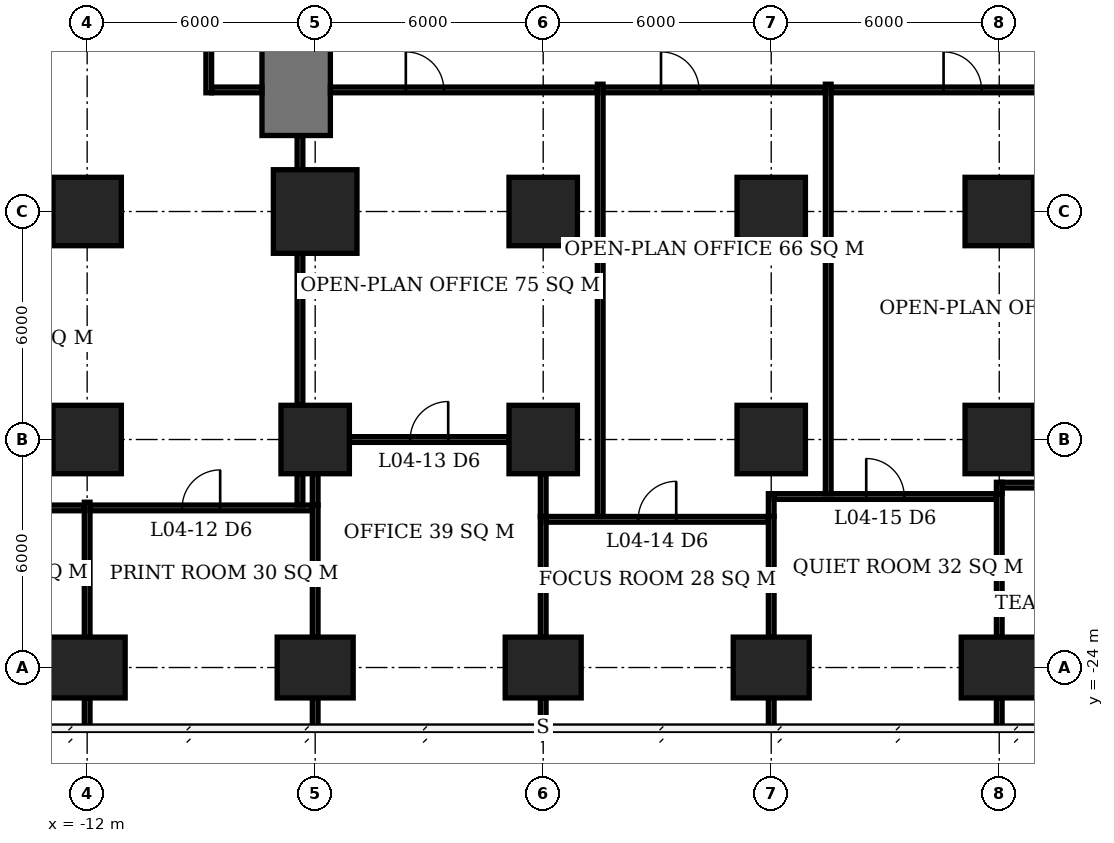
"""IFC4 building model, lengths in metres.
Left out: names, types, materials, properties, quantities, classifications, styles, units other than length and angle.
Written with IfcOpenShell. Run it as: python <this file> out.ifc"""

import sys

from ifc_helpers import new_model, si_unit, direction, frame, frame_2d, origin, origin_2d, place, context, subcontext, project, spatial, rectangle, extrude, element, fill, save


model = new_model("IFC4")
c1 = context("Model", 3, precision=1e-05, world=origin(), true_north=direction((0.0, 1.0)))
c2 = subcontext(c1, "Body", "Model", "MODEL_VIEW")
j1 = project(units=[si_unit("LENGTHUNIT", "METRE"), si_unit("PLANEANGLEUNIT", "RADIAN")], contexts=[c1])
p1 = place(None, origin())
s1 = spatial("IfcSite", under=j1, at=p1, CompositionType="ELEMENT")
p2 = place(p1, origin())
s2 = spatial("IfcBuilding", under=s1, at=p2, CompositionType="ELEMENT")
p3 = place(p2, frame((0.0, 0.0, 22.1)))
s3 = spatial("IfcBuildingStorey", under=s2, at=p3, CompositionType="ELEMENT", Elevation=22.1)
p4 = place(p3, frame((-12.0, -24.0, 0.0), z_axis=(0.0, 0.0, 1.0), x_axis=(1.0, 0.0, 0.0)))
e1 = element("IfcColumn", 1, at=p4, inside=s3, PredefinedType="COLUMN", context=c2, shape_type="SweptSolid", body=[
    extrude(rectangle(XDim=2.0, YDim=1.6, at=origin_2d()), origin(), (0.0, 0.0, 1.0), 3.9),
])
p5 = place(p3, frame((-12.0, -18.0, -0.55), z_axis=(0.0, 0.0, 1.0), x_axis=(1.0, 0.0, 0.0)))
e2 = element("IfcColumn", 2, at=p5, inside=s3, PredefinedType="COLUMN", context=c2, shape_type="SweptSolid", body=[
    extrude(rectangle(XDim=1.8, YDim=1.8, at=origin_2d()), origin(), (0.0, 0.0, 1.0), 4.45),
])
p6 = place(p3, frame((-12.0, -12.0, 0.0), z_axis=(0.0, 0.0, 1.0), x_axis=(1.0, 0.0, 0.0)))
e3 = element("IfcColumn", 3, at=p6, inside=s3, PredefinedType="COLUMN", context=c2, shape_type="SweptSolid", body=[
    extrude(rectangle(XDim=1.8, YDim=1.8, at=origin_2d()), origin(), (0.0, 0.0, 1.0), 3.9),
])
p7 = place(p3, frame((-6.0, -24.0, 0.0), z_axis=(0.0, 0.0, 1.0), x_axis=(1.0, 0.0, 0.0)))
e4 = element("IfcColumn", 4, at=p7, inside=s3, PredefinedType="COLUMN", context=c2, shape_type="SweptSolid", body=[
    extrude(rectangle(XDim=2.0, YDim=1.6, at=origin_2d()), origin(), (0.0, 0.0, 1.0), 3.9),
])
p8 = place(p3, frame((-6.0, -18.0, -0.55), z_axis=(0.0, 0.0, 1.0), x_axis=(1.0, 0.0, 0.0)))
e5 = element("IfcColumn", 5, at=p8, inside=s3, PredefinedType="COLUMN", context=c2, shape_type="SweptSolid", body=[
    extrude(rectangle(XDim=1.8, YDim=1.8, at=origin_2d()), origin(), (0.0, 0.0, 1.0), 4.45),
])
p9 = place(p3, frame((-6.0, -12.0, 0.0), z_axis=(0.0, 0.0, 1.0), x_axis=(1.0, 0.0, 0.0)))
e6 = element("IfcColumn", 6, at=p9, inside=s3, PredefinedType="COLUMN", context=c2, shape_type="SweptSolid", body=[
    extrude(rectangle(XDim=2.2, YDim=2.2, at=origin_2d()), origin(), (0.0, 0.0, 1.0), 3.9),
])
p10 = place(p3, frame((0.0, -24.0, 0.0), z_axis=(0.0, 0.0, 1.0), x_axis=(1.0, 0.0, 0.0)))
e7 = element("IfcColumn", 7, at=p10, inside=s3, PredefinedType="COLUMN", context=c2, shape_type="SweptSolid", body=[
    extrude(rectangle(XDim=2.0, YDim=1.6, at=origin_2d()), origin(), (0.0, 0.0, 1.0), 3.9),
])
p11 = place(p3, frame((0.0, -18.0, -0.55), z_axis=(0.0, 0.0, 1.0), x_axis=(1.0, 0.0, 0.0)))
e8 = element("IfcColumn", 8, at=p11, inside=s3, PredefinedType="COLUMN", context=c2, shape_type="SweptSolid", body=[
    extrude(rectangle(XDim=1.8, YDim=1.8, at=origin_2d()), origin(), (0.0, 0.0, 1.0), 4.45),
])
p12 = place(p3, frame((0.0, -12.0, 0.0), z_axis=(0.0, 0.0, 1.0), x_axis=(1.0, 0.0, 0.0)))
e9 = element("IfcColumn", 9, at=p12, inside=s3, PredefinedType="COLUMN", context=c2, shape_type="SweptSolid", body=[
    extrude(rectangle(XDim=1.8, YDim=1.8, at=origin_2d()), origin(), (0.0, 0.0, 1.0), 3.9),
])
p13 = place(p3, frame((6.0, -24.0, 0.0), z_axis=(0.0, 0.0, 1.0), x_axis=(1.0, 0.0, 0.0)))
e10 = element("IfcColumn", 10, at=p13, inside=s3, PredefinedType="COLUMN", context=c2, shape_type="SweptSolid", body=[
    extrude(rectangle(XDim=2.0, YDim=1.6, at=origin_2d()), origin(), (0.0, 0.0, 1.0), 3.9),
])
p14 = place(p3, frame((6.0, -18.0, -0.55), z_axis=(0.0, 0.0, 1.0), x_axis=(1.0, 0.0, 0.0)))
e11 = element("IfcColumn", 11, at=p14, inside=s3, PredefinedType="COLUMN", context=c2, shape_type="SweptSolid", body=[
    extrude(rectangle(XDim=1.8, YDim=1.8, at=origin_2d()), origin(), (0.0, 0.0, 1.0), 4.45),
])
p15 = place(p3, frame((6.0, -12.0, 0.0), z_axis=(0.0, 0.0, 1.0), x_axis=(1.0, 0.0, 0.0)))
e12 = element("IfcColumn", 12, at=p15, inside=s3, PredefinedType="COLUMN", context=c2, shape_type="SweptSolid", body=[
    extrude(rectangle(XDim=1.8, YDim=1.8, at=origin_2d()), origin(), (0.0, 0.0, 1.0), 3.9),
])
p16 = place(p3, frame((12.0, -24.0, 0.0), z_axis=(0.0, 0.0, 1.0), x_axis=(1.0, 0.0, 0.0)))
e13 = element("IfcColumn", 13, at=p16, inside=s3, PredefinedType="COLUMN", context=c2, shape_type="SweptSolid", body=[
    extrude(rectangle(XDim=2.0, YDim=1.6, at=origin_2d()), origin(), (0.0, 0.0, 1.0), 3.9),
])
p17 = place(p3, frame((12.0, -18.0, -0.55), z_axis=(0.0, 0.0, 1.0), x_axis=(1.0, 0.0, 0.0)))
e14 = element("IfcColumn", 14, at=p17, inside=s3, PredefinedType="COLUMN", context=c2, shape_type="SweptSolid", body=[
    extrude(rectangle(XDim=1.8, YDim=1.8, at=origin_2d()), origin(), (0.0, 0.0, 1.0), 4.45),
])
p18 = place(p3, frame((12.0, -12.0, 0.0), z_axis=(0.0, 0.0, 1.0), x_axis=(1.0, 0.0, 0.0)))
e15 = element("IfcColumn", 15, at=p18, inside=s3, PredefinedType="COLUMN", context=c2, shape_type="SweptSolid", body=[
    extrude(rectangle(XDim=1.8, YDim=1.8, at=origin_2d()), origin(), (0.0, 0.0, 1.0), 3.9),
])
p19 = place(p3, frame((-6.5, -10.0, 0.0), z_axis=(0.0, 0.0, 1.0), x_axis=(0.0, 1.0, 0.0)))
e16 = element("IfcWall", 16, at=p19, inside=s3, PredefinedType="SHEAR", context=c2, shape_type="SweptSolid", body=[
    extrude(rectangle(XDim=2.4, YDim=1.8, at=frame_2d((1.2, 0.0))), origin(), (0.0, 0.0, 1.0), 3.9),
])
p20 = place(p3, frame((0.075, -20.1, 0.0), z_axis=(0.0, 0.0, 1.0), x_axis=(1.0, 0.0, 0.0)))
e17 = element("IfcWall", 17, at=p20, inside=s3, PredefinedType="PARTITIONING", context=c2, shape_type="SweptSolid", body=[
    extrude(rectangle(XDim=5.85, YDim=0.15, at=frame_2d((2.925, 0.0))), origin(), (0.0, 0.0, 1.0), 3.65),
])
p21 = place(p20, frame((2.425, 0.0, 0.0)))
e18 = element("IfcOpeningElement", 18, at=p21, cuts=e17, PredefinedType="OPENING", context=c2, shape_type="SweptSolid", body=[
    extrude(rectangle(XDim=1.0, YDim=2.1, at=frame_2d((0.5, 1.05))), frame((0.0, 0.085, 0.0), z_axis=(0.0, -1.0, 0.0), x_axis=(1.0, 0.0, 0.0)), (0.0, 0.0, 1.0), 0.17),
])
p22 = place(p3, frame((-17.925, -19.8, 0.0), z_axis=(0.0, 0.0, 1.0), x_axis=(1.0, 0.0, 0.0)))
e19 = element("IfcWall", 19, at=p22, inside=s3, PredefinedType="PARTITIONING", context=c2, shape_type="SweptSolid", body=[
    extrude(rectangle(XDim=5.85, YDim=0.15, at=frame_2d((2.925, 0.0))), origin(), (0.0, 0.0, 1.0), 3.65),
])
p23 = place(p22, frame((2.425, 0.0, 0.0)))
e20 = element("IfcOpeningElement", 20, at=p23, cuts=e19, PredefinedType="OPENING", context=c2, shape_type="SweptSolid", body=[
    extrude(rectangle(XDim=1.0, YDim=2.1, at=frame_2d((0.5, 1.05))), frame((0.0, 0.085, 0.0), z_axis=(0.0, -1.0, 0.0), x_axis=(1.0, 0.0, 0.0)), (0.0, 0.0, 1.0), 0.17),
])
p24 = place(p3, frame((-11.925, -19.8, 0.0), z_axis=(0.0, 0.0, 1.0), x_axis=(1.0, 0.0, 0.0)))
e21 = element("IfcWall", 21, at=p24, inside=s3, PredefinedType="PARTITIONING", context=c2, shape_type="SweptSolid", body=[
    extrude(rectangle(XDim=5.85, YDim=0.15, at=frame_2d((2.925, 0.0))), origin(), (0.0, 0.0, 1.0), 3.65),
])
p25 = place(p24, frame((2.425, 0.0, 0.0)))
e22 = element("IfcOpeningElement", 22, at=p25, cuts=e21, PredefinedType="OPENING", context=c2, shape_type="SweptSolid", body=[
    extrude(rectangle(XDim=1.0, YDim=2.1, at=frame_2d((0.5, 1.05))), frame((0.0, 0.085, 0.0), z_axis=(0.0, -1.0, 0.0), x_axis=(1.0, 0.0, 0.0)), (0.0, 0.0, 1.0), 0.17),
])
p26 = place(p3, frame((6.075, -19.5, 0.0), z_axis=(0.0, 0.0, 1.0), x_axis=(1.0, 0.0, 0.0)))
e23 = element("IfcWall", 23, at=p26, inside=s3, PredefinedType="PARTITIONING", context=c2, shape_type="SweptSolid", body=[
    extrude(rectangle(XDim=5.85, YDim=0.15, at=frame_2d((2.925, 0.0))), origin(), (0.0, 0.0, 1.0), 3.65),
])
p27 = place(p26, frame((2.425, 0.0, 0.0)))
e24 = element("IfcOpeningElement", 24, at=p27, cuts=e23, PredefinedType="OPENING", context=c2, shape_type="SweptSolid", body=[
    extrude(rectangle(XDim=1.0, YDim=2.1, at=frame_2d((0.5, 1.05))), frame((0.0, 0.085, 0.0), z_axis=(0.0, -1.0, 0.0), x_axis=(1.0, 0.0, 0.0)), (0.0, 0.0, 1.0), 0.17),
])
p28 = place(p3, frame((12.075, -19.2, 0.0), z_axis=(0.0, 0.0, 1.0), x_axis=(1.0, 0.0, 0.0)))
e25 = element("IfcWall", 25, at=p28, inside=s3, PredefinedType="PARTITIONING", context=c2, shape_type="SweptSolid", body=[
    extrude(rectangle(XDim=5.85, YDim=0.15, at=frame_2d((2.925, 0.0))), origin(), (0.0, 0.0, 1.0), 3.65),
])
p29 = place(p28, frame((2.425, 0.0, 0.0)))
e26 = element("IfcOpeningElement", 26, at=p29, cuts=e25, PredefinedType="OPENING", context=c2, shape_type="SweptSolid", body=[
    extrude(rectangle(XDim=1.0, YDim=2.1, at=frame_2d((0.5, 1.05))), frame((0.0, 0.085, 0.0), z_axis=(0.0, -1.0, 0.0), x_axis=(1.0, 0.0, 0.0)), (0.0, 0.0, 1.0), 0.17),
])
p30 = place(p3, frame((-5.1, -18.0, 0.0), z_axis=(0.0, 0.0, 1.0), x_axis=(1.0, 0.0, 0.0)))
e27 = element("IfcWall", 27, at=p30, inside=s3, PredefinedType="PARTITIONING", context=c2, shape_type="SweptSolid", body=[
    extrude(rectangle(XDim=4.2, YDim=0.15, at=frame_2d((2.1, 0.0))), origin(), (0.0, 0.0, 1.0), 3.65),
])
p31 = place(p30, frame((1.6, 0.0, 0.0)))
e28 = element("IfcOpeningElement", 28, at=p31, cuts=e27, PredefinedType="OPENING", context=c2, shape_type="SweptSolid", body=[
    extrude(rectangle(XDim=1.0, YDim=2.1, at=frame_2d((0.5, 1.05))), frame((0.0, 0.085, 0.0), z_axis=(0.0, -1.0, 0.0), x_axis=(1.0, 0.0, 0.0)), (0.0, 0.0, 1.0), 0.17),
])
p32 = place(p3, frame((-12.0, -25.6, 0.0), z_axis=(0.0, 0.0, 1.0), x_axis=(0.0, 1.0, 0.0)))
e29 = element("IfcWall", 29, at=p32, inside=s3, PredefinedType="PARTITIONING", context=c2, shape_type="SweptSolid", body=[
    extrude(rectangle(XDim=0.8, YDim=0.15, at=frame_2d((0.4, 0.0))), origin(), (0.0, 0.0, 1.0), 3.65),
])
p33 = place(p3, frame((-12.0, -23.2, 0.0), z_axis=(0.0, 0.0, 1.0), x_axis=(0.0, 1.0, 0.0)))
e30 = element("IfcWall", 30, at=p33, inside=s3, PredefinedType="PARTITIONING", context=c2, shape_type="SweptSolid", body=[
    extrude(rectangle(XDim=3.55, YDim=0.15, at=frame_2d((1.775, 0.0))), origin(), (0.0, 0.0, 1.0), 3.65),
])
p34 = place(p3, frame((-6.0, -25.6, 0.0), z_axis=(0.0, 0.0, 1.0), x_axis=(0.0, 1.0, 0.0)))
e31 = element("IfcWall", 31, at=p34, inside=s3, PredefinedType="PARTITIONING", context=c2, shape_type="SweptSolid", body=[
    extrude(rectangle(XDim=0.8, YDim=0.15, at=frame_2d((0.4, 0.0))), origin(), (0.0, 0.0, 1.0), 3.65),
])
p35 = place(p3, frame((-6.0, -23.2, 0.0), z_axis=(0.0, 0.0, 1.0), x_axis=(0.0, 1.0, 0.0)))
e32 = element("IfcWall", 32, at=p35, inside=s3, PredefinedType="PARTITIONING", context=c2, shape_type="SweptSolid", body=[
    extrude(rectangle(XDim=3.475, YDim=0.15, at=frame_2d((1.737, 0.0))), origin(), (0.0, 0.0, 1.0), 3.65),
])
p36 = place(p3, frame((-6.0, -19.725, 0.0), z_axis=(0.0, 0.0, 1.0), x_axis=(0.0, 1.0, 0.0)))
e33 = element("IfcWall", 33, at=p36, inside=s3, PredefinedType="PARTITIONING", context=c2, shape_type="SweptSolid", body=[
    extrude(rectangle(XDim=0.825, YDim=0.15, at=frame_2d((0.413, 0.0))), origin(), (0.0, 0.0, 1.0), 3.65),
])
p37 = place(p3, frame((0.0, -25.55, 0.0), z_axis=(0.0, 0.0, 1.0), x_axis=(0.0, 1.0, 0.0)))
e34 = element("IfcWall", 34, at=p37, inside=s3, PredefinedType="PARTITIONING", context=c2, shape_type="SweptSolid", body=[
    extrude(rectangle(XDim=0.75, YDim=0.15, at=frame_2d((0.375, 0.0))), origin(), (0.0, 0.0, 1.0), 3.65),
])
p38 = place(p3, frame((0.0, -23.2, 0.0), z_axis=(0.0, 0.0, 1.0), x_axis=(0.0, 1.0, 0.0)))
e35 = element("IfcWall", 35, at=p38, inside=s3, PredefinedType="PARTITIONING", context=c2, shape_type="SweptSolid", body=[
    extrude(rectangle(XDim=3.175, YDim=0.15, at=frame_2d((1.587, 0.0))), origin(), (0.0, 0.0, 1.0), 3.65),
])
p39 = place(p3, frame((0.0, -20.025, 0.0), z_axis=(0.0, 0.0, 1.0), x_axis=(0.0, 1.0, 0.0)))
e36 = element("IfcWall", 36, at=p39, inside=s3, PredefinedType="PARTITIONING", context=c2, shape_type="SweptSolid", body=[
    extrude(rectangle(XDim=1.125, YDim=0.15, at=frame_2d((0.562, 0.0))), origin(), (0.0, 0.0, 1.0), 3.65),
])
p40 = place(p3, frame((6.0, -25.6, 0.0), z_axis=(0.0, 0.0, 1.0), x_axis=(0.0, 1.0, 0.0)))
e37 = element("IfcWall", 37, at=p40, inside=s3, PredefinedType="PARTITIONING", context=c2, shape_type="SweptSolid", body=[
    extrude(rectangle(XDim=0.8, YDim=0.15, at=frame_2d((0.4, 0.0))), origin(), (0.0, 0.0, 1.0), 3.65),
])
p41 = place(p3, frame((6.0, -23.2, 0.0), z_axis=(0.0, 0.0, 1.0), x_axis=(0.0, 1.0, 0.0)))
e38 = element("IfcWall", 38, at=p41, inside=s3, PredefinedType="PARTITIONING", context=c2, shape_type="SweptSolid", body=[
    extrude(rectangle(XDim=3.175, YDim=0.15, at=frame_2d((1.587, 0.0))), origin(), (0.0, 0.0, 1.0), 3.65),
])
p42 = place(p3, frame((6.0, -20.025, 0.0), z_axis=(0.0, 0.0, 1.0), x_axis=(0.0, 1.0, 0.0)))
e39 = element("IfcWall", 39, at=p42, inside=s3, PredefinedType="PARTITIONING", context=c2, shape_type="SweptSolid", body=[
    extrude(rectangle(XDim=0.6, YDim=0.15, at=frame_2d((0.3, 0.0))), origin(), (0.0, 0.0, 1.0), 3.65),
])
p43 = place(p3, frame((12.0, -25.6, 0.0), z_axis=(0.0, 0.0, 1.0), x_axis=(0.0, 1.0, 0.0)))
e40 = element("IfcWall", 40, at=p43, inside=s3, PredefinedType="PARTITIONING", context=c2, shape_type="SweptSolid", body=[
    extrude(rectangle(XDim=0.8, YDim=0.15, at=frame_2d((0.4, 0.0))), origin(), (0.0, 0.0, 1.0), 3.65),
])
p44 = place(p3, frame((12.0, -23.2, 0.0), z_axis=(0.0, 0.0, 1.0), x_axis=(0.0, 1.0, 0.0)))
e41 = element("IfcWall", 41, at=p44, inside=s3, PredefinedType="PARTITIONING", context=c2, shape_type="SweptSolid", body=[
    extrude(rectangle(XDim=3.775, YDim=0.15, at=frame_2d((1.887, 0.0))), origin(), (0.0, 0.0, 1.0), 3.65),
])
p45 = place(p3, frame((12.0, -19.425, 0.0), z_axis=(0.0, 0.0, 1.0), x_axis=(0.0, 1.0, 0.0)))
e42 = element("IfcWall", 42, at=p45, inside=s3, PredefinedType="PARTITIONING", context=c2, shape_type="SweptSolid", body=[
    extrude(rectangle(XDim=0.3, YDim=0.15, at=frame_2d((0.15, 0.0))), origin(), (0.0, 0.0, 1.0), 3.65),
])
p46 = place(p3, frame((-8.8, -8.875, 0.0), z_axis=(0.0, 0.0, 1.0), x_axis=(0.0, 1.0, 0.0)))
e43 = element("IfcWall", 43, at=p46, inside=s3, PredefinedType="PARTITIONING", context=c2, shape_type="SweptSolid", body=[
    extrude(rectangle(XDim=1.375, YDim=0.15, at=frame_2d((0.688, 0.0))), origin(), (0.0, 0.0, 1.0), 3.65),
])
p47 = place(p3, frame((-8.725, -8.8, 0.0), z_axis=(0.0, 0.0, 1.0), x_axis=(1.0, 0.0, 0.0)))
e44 = element("IfcWall", 44, at=p47, inside=s3, PredefinedType="PARTITIONING", context=c2, shape_type="SweptSolid", body=[
    extrude(rectangle(XDim=1.325, YDim=0.15, at=frame_2d((0.663, 0.0))), origin(), (0.0, 0.0, 1.0), 3.65),
])
p48 = place(p3, frame((-6.4, -19.725, 0.0), z_axis=(0.0, 0.0, 1.0), x_axis=(0.0, 1.0, 0.0)))
e45 = element("IfcWall", 45, at=p48, inside=s3, PredefinedType="PARTITIONING", context=c2, shape_type="SweptSolid", body=[
    extrude(rectangle(XDim=0.825, YDim=0.15, at=frame_2d((0.413, 0.0))), origin(), (0.0, 0.0, 1.0), 3.65),
])
p49 = place(p3, frame((-6.4, -17.1, 0.0), z_axis=(0.0, 0.0, 1.0), x_axis=(0.0, 1.0, 0.0)))
e46 = element("IfcWall", 46, at=p49, inside=s3, PredefinedType="PARTITIONING", context=c2, shape_type="SweptSolid", body=[
    extrude(rectangle(XDim=4.0, YDim=0.15, at=frame_2d((2.0, 0.0))), origin(), (0.0, 0.0, 1.0), 3.65),
])
p50 = place(p3, frame((-6.4, -10.9, 0.0), z_axis=(0.0, 0.0, 1.0), x_axis=(0.0, 1.0, 0.0)))
e47 = element("IfcWall", 47, at=p50, inside=s3, PredefinedType="PARTITIONING", context=c2, shape_type="SweptSolid", body=[
    extrude(rectangle(XDim=0.9, YDim=0.15, at=frame_2d((0.45, 0.0))), origin(), (0.0, 0.0, 1.0), 3.65),
])
p51 = place(p3, frame((-5.6, -8.8, 0.0), z_axis=(0.0, 0.0, 1.0), x_axis=(1.0, 0.0, 0.0)))
e48 = element("IfcWall", 48, at=p51, inside=s3, PredefinedType="PARTITIONING", context=c2, shape_type="SweptSolid", body=[
    extrude(rectangle(XDim=7.025, YDim=0.15, at=frame_2d((3.513, 0.0))), origin(), (0.0, 0.0, 1.0), 3.65),
])
p52 = place(p51, frame((1.985, 0.0, 0.0)))
e49 = element("IfcOpeningElement", 49, at=p52, cuts=e48, PredefinedType="OPENING", context=c2, shape_type="SweptSolid", body=[
    extrude(rectangle(XDim=1.0, YDim=2.1, at=frame_2d((0.5, 1.05))), frame((0.0, 0.085, 0.0), z_axis=(0.0, -1.0, 0.0), x_axis=(1.0, 0.0, 0.0)), (0.0, 0.0, 1.0), 0.17),
])
p53 = place(p3, frame((1.5, -20.025, 0.0), z_axis=(0.0, 0.0, 1.0), x_axis=(0.0, 1.0, 0.0)))
e50 = element("IfcWall", 50, at=p53, inside=s3, PredefinedType="PARTITIONING", context=c2, shape_type="SweptSolid", body=[
    extrude(rectangle(XDim=11.375, YDim=0.15, at=frame_2d((5.688, 0.0))), origin(), (0.0, 0.0, 1.0), 3.65),
])
p54 = place(p3, frame((1.575, -8.8, 0.0), z_axis=(0.0, 0.0, 1.0), x_axis=(1.0, 0.0, 0.0)))
e51 = element("IfcWall", 51, at=p54, inside=s3, PredefinedType="PARTITIONING", context=c2, shape_type="SweptSolid", body=[
    extrude(rectangle(XDim=5.85, YDim=0.15, at=frame_2d((2.925, 0.0))), origin(), (0.0, 0.0, 1.0), 3.65),
])
p55 = place(p54, frame((1.525, 0.0, 0.0)))
e52 = element("IfcOpeningElement", 52, at=p55, cuts=e51, PredefinedType="OPENING", context=c2, shape_type="SweptSolid", body=[
    extrude(rectangle(XDim=1.0, YDim=2.1, at=frame_2d((0.5, 1.05))), frame((0.0, 0.085, 0.0), z_axis=(0.0, -1.0, 0.0), x_axis=(1.0, 0.0, 0.0)), (0.0, 0.0, 1.0), 0.17),
])
p56 = place(p3, frame((7.5, -19.425, 0.0), z_axis=(0.0, 0.0, 1.0), x_axis=(0.0, 1.0, 0.0)))
e53 = element("IfcWall", 53, at=p56, inside=s3, PredefinedType="PARTITIONING", context=c2, shape_type="SweptSolid", body=[
    extrude(rectangle(XDim=10.775, YDim=0.15, at=frame_2d((5.388, 0.0))), origin(), (0.0, 0.0, 1.0), 3.65),
])
p57 = place(p3, frame((7.575, -8.8, 0.0), z_axis=(0.0, 0.0, 1.0), x_axis=(1.0, 0.0, 0.0)))
e54 = element("IfcWall", 54, at=p57, inside=s3, PredefinedType="PARTITIONING", context=c2, shape_type="SweptSolid", body=[
    extrude(rectangle(XDim=10.025, YDim=0.15, at=frame_2d((5.013, 0.0))), origin(), (0.0, 0.0, 1.0), 3.65),
])
p58 = place(p57, frame((2.96, 0.0, 0.0)))
e55 = element("IfcOpeningElement", 55, at=p58, cuts=e54, PredefinedType="OPENING", context=c2, shape_type="SweptSolid", body=[
    extrude(rectangle(XDim=1.0, YDim=2.1, at=frame_2d((0.5, 1.05))), frame((0.0, 0.085, 0.0), z_axis=(0.0, -1.0, 0.0), x_axis=(1.0, 0.0, 0.0)), (0.0, 0.0, 1.0), 0.17),
])
p59 = place(p25, origin())
e56 = element("IfcDoor", 56, at=p59, inside=s3, OperationType="SINGLE_SWING_RIGHT", PredefinedType="DOOR", context=c2, shape_type="SweptSolid", body=[
    extrude(rectangle(XDim=1.0, YDim=2.1, at=frame_2d((0.5, 1.05))), frame((0.0, 0.025, 0.0), z_axis=(0.0, -1.0, 0.0), x_axis=(1.0, 0.0, 0.0)), (0.0, 0.0, 1.0), 0.05),
])
fill(e22, e56)
p60 = place(p31, origin())
e57 = element("IfcDoor", 57, at=p60, inside=s3, OperationType="SINGLE_SWING_RIGHT", PredefinedType="DOOR", context=c2, shape_type="SweptSolid", body=[
    extrude(rectangle(XDim=1.0, YDim=2.1, at=frame_2d((0.5, 1.05))), frame((0.0, 0.025, 0.0), z_axis=(0.0, -1.0, 0.0), x_axis=(1.0, 0.0, 0.0)), (0.0, 0.0, 1.0), 0.05),
])
fill(e28, e57)
p61 = place(p21, origin())
e58 = element("IfcDoor", 58, at=p61, inside=s3, OperationType="SINGLE_SWING_RIGHT", PredefinedType="DOOR", context=c2, shape_type="SweptSolid", body=[
    extrude(rectangle(XDim=1.0, YDim=2.1, at=frame_2d((0.5, 1.05))), frame((0.0, 0.025, 0.0), z_axis=(0.0, -1.0, 0.0), x_axis=(1.0, 0.0, 0.0)), (0.0, 0.0, 1.0), 0.05),
])
fill(e18, e58)
p62 = place(p27, origin())
e59 = element("IfcDoor", 59, at=p62, inside=s3, OperationType="SINGLE_SWING_LEFT", PredefinedType="DOOR", context=c2, shape_type="SweptSolid", body=[
    extrude(rectangle(XDim=1.0, YDim=2.1, at=frame_2d((0.5, 1.05))), frame((0.0, 0.025, 0.0), z_axis=(0.0, -1.0, 0.0), x_axis=(1.0, 0.0, 0.0)), (0.0, 0.0, 1.0), 0.05),
])
fill(e24, e59)
p63 = place(p55, origin())
e60 = element("IfcDoor", 60, at=p63, inside=s3, OperationType="SINGLE_SWING_LEFT", PredefinedType="DOOR", context=c2, shape_type="SweptSolid", body=[
    extrude(rectangle(XDim=1.0, YDim=2.1, at=frame_2d((0.5, 1.05))), frame((0.0, 0.025, 0.0), z_axis=(0.0, -1.0, 0.0), x_axis=(1.0, 0.0, 0.0)), (0.0, 0.0, 1.0), 0.05),
])
fill(e52, e60)
p64 = place(p58, origin())
e61 = element("IfcDoor", 61, at=p64, inside=s3, OperationType="SINGLE_SWING_LEFT", PredefinedType="DOOR", context=c2, shape_type="SweptSolid", body=[
    extrude(rectangle(XDim=1.0, YDim=2.1, at=frame_2d((0.5, 1.05))), frame((0.0, 0.025, 0.0), z_axis=(0.0, -1.0, 0.0), x_axis=(1.0, 0.0, 0.0)), (0.0, 0.0, 1.0), 0.05),
])
fill(e55, e61)
p65 = place(p52, origin())
e62 = element("IfcDoor", 62, at=p65, inside=s3, OperationType="SINGLE_SWING_LEFT", PredefinedType="DOOR", context=c2, shape_type="SweptSolid", body=[
    extrude(rectangle(XDim=1.0, YDim=2.1, at=frame_2d((0.5, 1.05))), frame((0.0, 0.025, 0.0), z_axis=(0.0, -1.0, 0.0), x_axis=(1.0, 0.0, 0.0)), (0.0, 0.0, 1.0), 0.05),
])
fill(e49, e62)
save(model, sys.argv[1])
